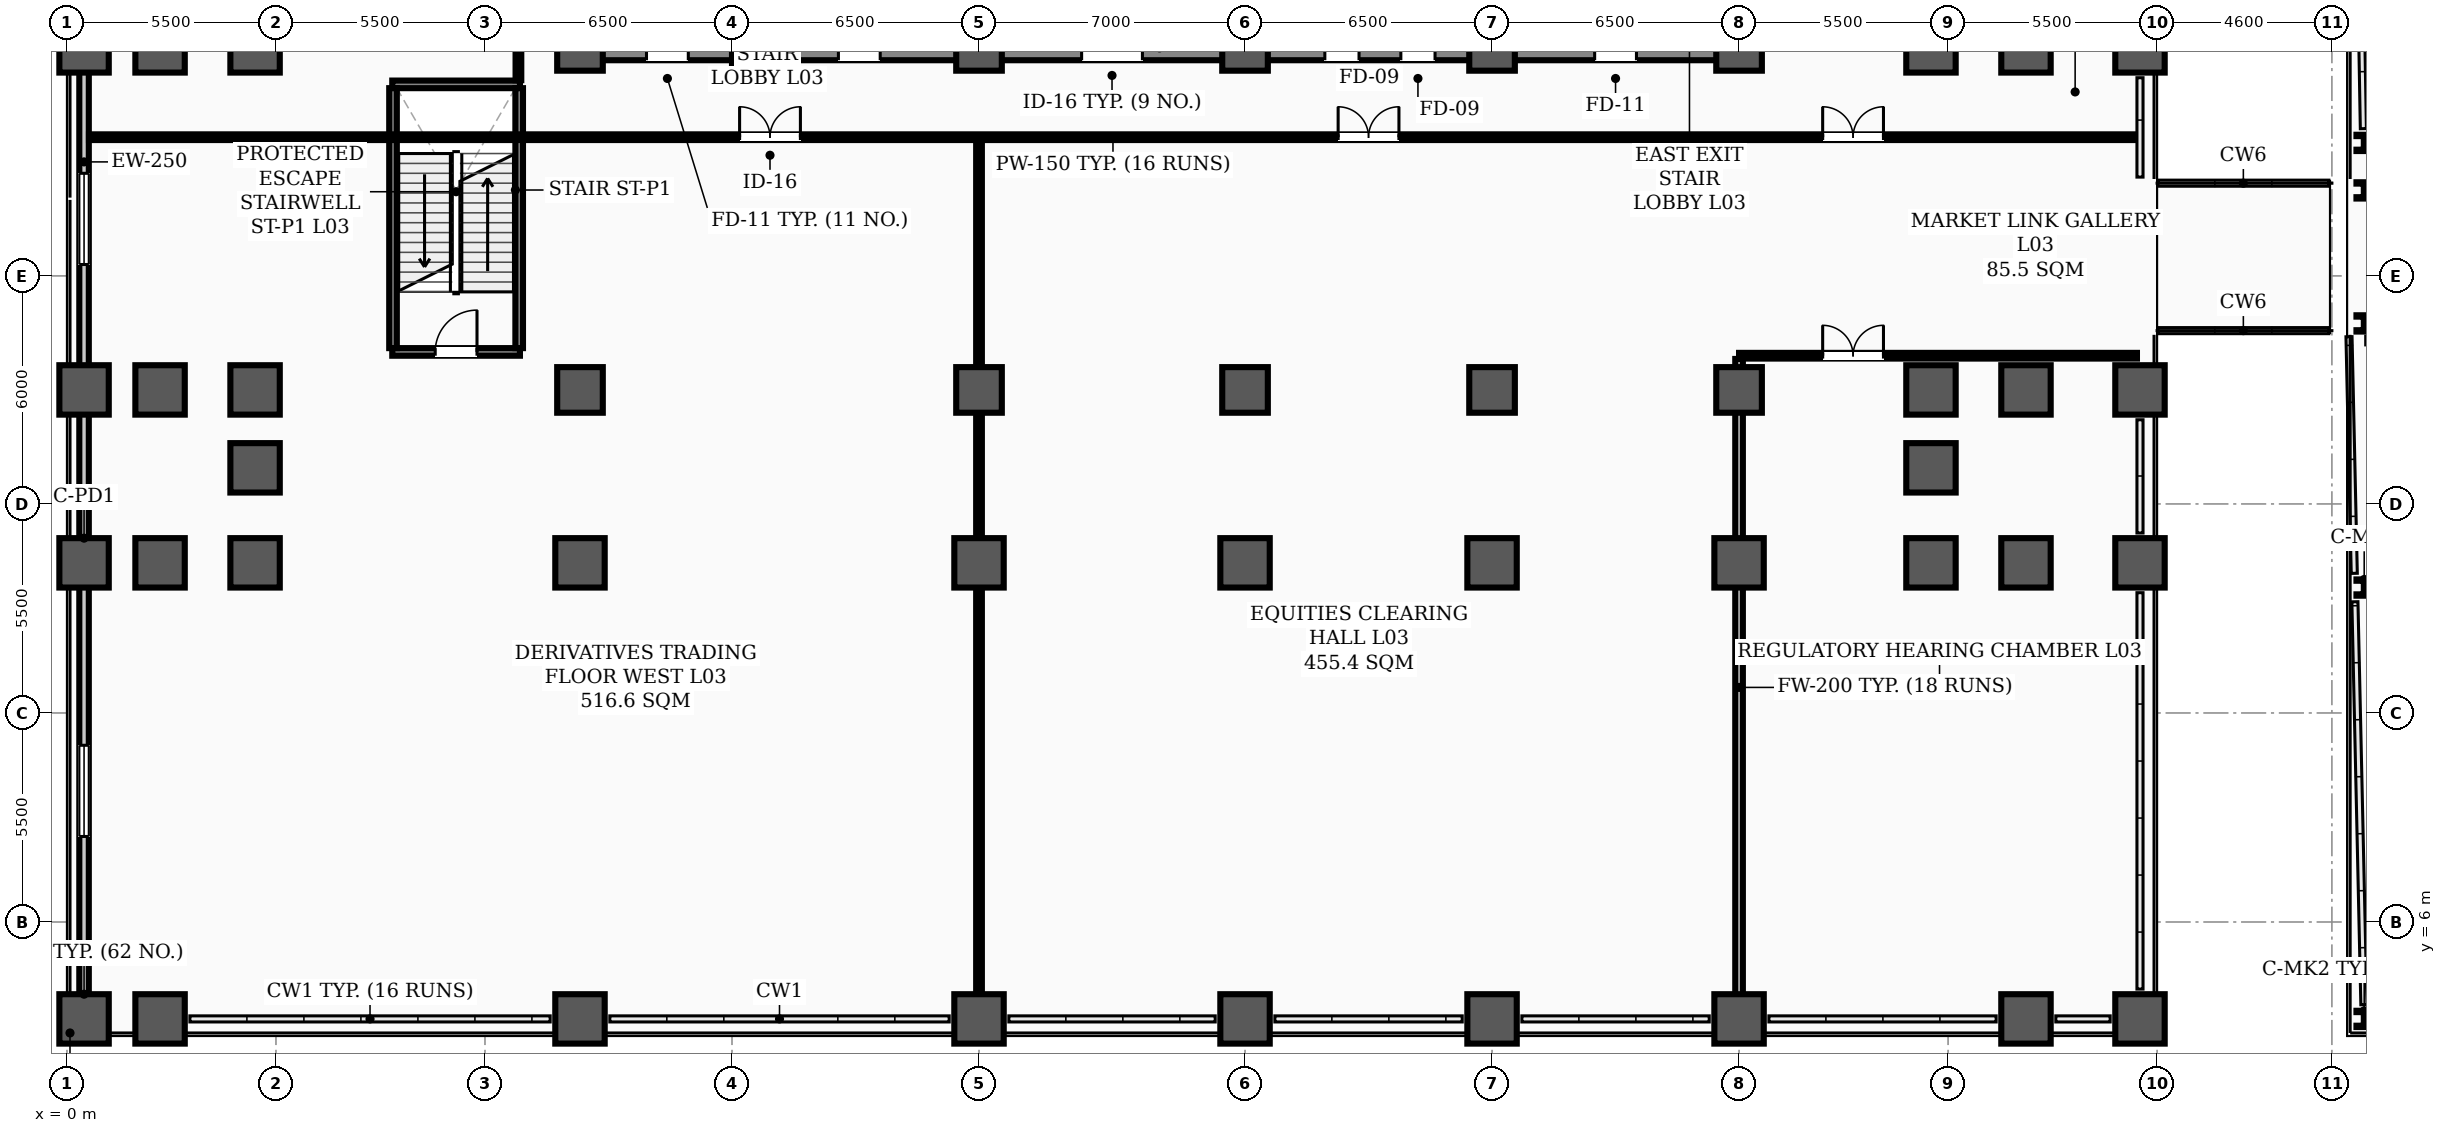
"""IFC4 building model, lengths in metres.
Left out: names, types, materials, properties, quantities, classifications, styles, units other than length and angle.
Written with IfcOpenShell. Run it as: python <this file> out.ifc"""

import sys

from ifc_helpers import new_model, si_unit, direction, frame, frame_2d, origin, origin_2d, place, context, subcontext, project, spatial, rectangle, hollow_rectangle, i_section, extrude, element, fill, save


model = new_model("IFC4")
c1 = context("Model", 3, precision=1e-05, world=origin(), true_north=direction((0.0, 1.0)))
c2 = subcontext(c1, "Body", "Model", "MODEL_VIEW")
j1 = project(units=[si_unit("LENGTHUNIT", "METRE"), si_unit("PLANEANGLEUNIT", "RADIAN")], contexts=[c1])
p1 = place(None, origin())
s1 = spatial("IfcSite", under=j1, at=p1, CompositionType="ELEMENT")
p2 = place(p1, origin())
s2 = spatial("IfcBuilding", under=s1, at=p2, CompositionType="ELEMENT")
p3 = place(p2, frame((0.0, 0.0, 11.2)))
s3 = spatial("IfcBuildingStorey", under=s2, at=p3, CompositionType="ELEMENT", Elevation=11.2)
for number, where, z_axis, x_axis in (
    (1, (13.5, 29.0, 0.0), (0.0, 0.0, 1.0), (1.0, 0.0, 0.0)),
    (2, (18.1, 29.0, 0.0), (0.0, 0.0, 1.0), (1.0, 0.0, 0.0)),
    (3, (24.0, 29.0, 0.0), (0.0, 0.0, 1.0), (1.0, 0.0, 0.0)),
    (4, (31.0, 29.0, 0.0), (0.0, 0.0, 1.0), (1.0, 0.0, 0.0)),
    (5, (37.5, 29.0, 0.0), (0.0, 0.0, 1.0), (1.0, 0.0, 0.0)),
    (6, (44.0, 29.0, 0.0), (0.0, 0.0, 1.0), (1.0, 0.0, 0.0)),
    (7, (13.5, 20.0, 0.0), (0.0, 0.0, 1.0), (1.0, 0.0, 0.0)),
    (8, (24.0, 20.0, 0.0), (0.0, 0.0, 1.0), (1.0, 0.0, 0.0)),
    (9, (31.0, 20.0, 0.0), (0.0, 0.0, 1.0), (1.0, 0.0, 0.0)),
    (10, (37.5, 20.0, 0.0), (0.0, 0.0, 1.0), (1.0, 0.0, 0.0)),
    (11, (44.0, 20.0, 0.0), (0.0, 0.0, 1.0), (1.0, 0.0, 0.0)),
):
    element("IfcColumn", number, at=place(p3, frame(where, z_axis=z_axis, x_axis=x_axis)), inside=s3, PredefinedType="COLUMN", context=c2, shape_type="SweptSolid", body=[
        extrude(hollow_rectangle(XDim=1.2, YDim=1.2, WallThickness=0.04, InnerFilletRadius=0.02, OuterFilletRadius=0.06, at=origin_2d()), origin(), (0.0, 0.0, 1.0), 5.4),
    ])
for number, where, z_axis, x_axis in (
    (12, (0.45, 3.45, 0.0), (0.0, 0.0, 1.0), (1.0, 0.0, 0.0)),
    (13, (0.45, 15.45, 0.0), (0.0, 0.0, 1.0), (1.0, 0.0, 0.0)),
    (14, (0.45, 20.0, 0.0), (0.0, 0.0, 1.0), (1.0, 0.0, 0.0)),
    (15, (0.45, 29.0, 0.0), (0.0, 0.0, 1.0), (1.0, 0.0, 0.0)),
    (16, (2.45, 3.45, 0.0), (0.0, 0.0, 1.0), (1.0, 0.0, 0.0)),
    (17, (2.45, 15.45, 0.0), (0.0, 0.0, 1.0), (1.0, 0.0, 0.0)),
    (18, (2.45, 20.0, 0.0), (0.0, 0.0, 1.0), (1.0, 0.0, 0.0)),
    (19, (2.45, 29.0, 0.0), (0.0, 0.0, 1.0), (1.0, 0.0, 0.0)),
    (20, (4.95, 15.45, 0.0), (0.0, 0.0, 1.0), (1.0, 0.0, 0.0)),
    (21, (4.95, 17.95, 0.0), (0.0, 0.0, 1.0), (1.0, 0.0, 0.0)),
    (22, (4.95, 20.0, 0.0), (0.0, 0.0, 1.0), (1.0, 0.0, 0.0)),
    (23, (4.95, 29.0, 0.0), (0.0, 0.0, 1.0), (1.0, 0.0, 0.0)),
    (24, (13.5, 3.45, 0.0), (0.0, 0.0, 1.0), (1.0, 0.0, 0.0)),
    (25, (13.5, 15.45, 0.0), (0.0, 0.0, 1.0), (1.0, 0.0, 0.0)),
    (26, (24.0, 3.45, 0.0), (0.0, 0.0, 1.0), (1.0, 0.0, 0.0)),
    (27, (24.0, 15.45, 0.0), (0.0, 0.0, 1.0), (1.0, 0.0, 0.0)),
    (28, (31.0, 3.45, 0.0), (0.0, 0.0, 1.0), (1.0, 0.0, 0.0)),
    (29, (31.0, 15.45, 0.0), (0.0, 0.0, 1.0), (1.0, 0.0, 0.0)),
    (30, (37.5, 3.45, 0.0), (0.0, 0.0, 1.0), (1.0, 0.0, 0.0)),
    (31, (37.5, 15.45, 0.0), (0.0, 0.0, 1.0), (1.0, 0.0, 0.0)),
    (32, (44.0, 3.45, 0.0), (0.0, 0.0, 1.0), (1.0, 0.0, 0.0)),
    (33, (44.0, 15.45, 0.0), (0.0, 0.0, 1.0), (1.0, 0.0, 0.0)),
    (34, (49.05, 15.45, 0.0), (0.0, 0.0, 1.0), (1.0, 0.0, 0.0)),
    (35, (49.05, 17.95, 0.0), (0.0, 0.0, 1.0), (1.0, 0.0, 0.0)),
    (36, (49.05, 20.0, 0.0), (0.0, 0.0, 1.0), (1.0, 0.0, 0.0)),
    (37, (49.05, 29.0, 0.0), (0.0, 0.0, 1.0), (1.0, 0.0, 0.0)),
    (38, (51.55, 3.45, 0.0), (0.0, 0.0, 1.0), (1.0, 0.0, 0.0)),
    (39, (51.55, 15.45, 0.0), (0.0, 0.0, 1.0), (1.0, 0.0, 0.0)),
    (40, (51.55, 20.0, 0.0), (0.0, 0.0, 1.0), (1.0, 0.0, 0.0)),
    (41, (51.55, 29.0, 0.0), (0.0, 0.0, 1.0), (1.0, 0.0, 0.0)),
    (42, (54.55, 3.45, 0.0), (0.0, 0.0, 1.0), (1.0, 0.0, 0.0)),
    (43, (54.55, 15.45, 0.0), (0.0, 0.0, 1.0), (1.0, 0.0, 0.0)),
    (44, (54.55, 20.0, 0.0), (0.0, 0.0, 1.0), (1.0, 0.0, 0.0)),
    (45, (54.55, 29.0, 0.0), (0.0, 0.0, 1.0), (1.0, 0.0, 0.0)),
):
    element("IfcColumn", number, at=place(p3, frame(where, z_axis=z_axis, x_axis=x_axis)), inside=s3, PredefinedType="COLUMN", context=c2, shape_type="SweptSolid", body=[
        extrude(rectangle(XDim=1.3, YDim=1.3, at=origin_2d()), origin(), (0.0, 0.0, 1.0), 5.4),
    ])
for number, where, z_axis, x_axis in (
    (46, (60.45, 3.45, 0.0), (0.0, 0.0, 1.0), (1.0, 0.0, 0.0)),
    (47, (60.45, 14.8, 0.0), (0.0, 0.0, 1.0), (1.0, 0.0, 0.0)),
    (48, (60.45, 21.75, 0.0), (0.0, 0.0, 1.0), (1.0, 0.0, 0.0)),
    (49, (60.45, 25.25, 0.0), (0.0, 0.0, 1.0), (1.0, 0.0, 0.0)),
    (50, (60.45, 26.5, 0.0), (0.0, 0.0, 1.0), (1.0, 0.0, 0.0)),
):
    element("IfcColumn", number, at=place(p3, frame(where, z_axis=z_axis, x_axis=x_axis)), inside=s3, PredefinedType="COLUMN", context=c2, shape_type="SweptSolid", body=[
        extrude(i_section(OverallWidth=0.407, OverallDepth=0.428, WebThickness=0.02, FlangeThickness=0.035, FilletRadius=0.022, at=origin_2d()), origin(), (0.0, 0.0, 1.0), 5.4),
    ])
p4 = place(p3, frame((0.45, 3.45, 0.0), z_axis=(0.0, 0.0, 1.0), x_axis=(0.0, 1.0, 0.0)))
e51 = element("IfcWall", 51, at=p4, inside=s3, PredefinedType="STANDARD", context=c2, shape_type="SweptSolid", body=[
    extrude(rectangle(XDim=45.1, YDim=0.25, at=frame_2d((22.55, 0.0))), origin(), (0.0, 0.0, 1.0), 4.37),
])
p5 = place(p4, frame((4.8, 0.0, 0.9)))
e52 = element("IfcOpeningElement", 52, at=p5, cuts=e51, PredefinedType="OPENING", context=c2, shape_type="SweptSolid", body=[
    extrude(rectangle(XDim=2.4, YDim=2.1, at=frame_2d((1.2, 1.05))), frame((0.0, 0.135, 0.0), z_axis=(0.0, -1.0, 0.0), x_axis=(1.0, 0.0, 0.0)), (0.0, 0.0, 1.0), 0.27),
])
p6 = place(p4, frame((19.85, 0.0, 0.9)))
e53 = element("IfcOpeningElement", 53, at=p6, cuts=e51, PredefinedType="OPENING", context=c2, shape_type="SweptSolid", body=[
    extrude(rectangle(XDim=2.4, YDim=2.1, at=frame_2d((1.2, 1.05))), frame((0.0, 0.135, 0.0), z_axis=(0.0, -1.0, 0.0), x_axis=(1.0, 0.0, 0.0)), (0.0, 0.0, 1.0), 0.27),
])
p7 = place(p4, frame((29.0, 0.0, 0.9)))
e54 = element("IfcOpeningElement", 54, at=p7, cuts=e51, PredefinedType="OPENING", context=c2, shape_type="SweptSolid", body=[
    extrude(rectangle(XDim=2.4, YDim=2.1, at=frame_2d((1.2, 1.05))), frame((0.0, 0.135, 0.0), z_axis=(0.0, -1.0, 0.0), x_axis=(1.0, 0.0, 0.0)), (0.0, 0.0, 1.0), 0.27),
])
p8 = place(p4, frame((36.75, 0.0, 0.9)))
e55 = element("IfcOpeningElement", 55, at=p8, cuts=e51, PredefinedType="OPENING", context=c2, shape_type="SweptSolid", body=[
    extrude(rectangle(XDim=2.4, YDim=2.1, at=frame_2d((1.2, 1.05))), frame((0.0, 0.135, 0.0), z_axis=(0.0, -1.0, 0.0), x_axis=(1.0, 0.0, 0.0)), (0.0, 0.0, 1.0), 0.27),
])
p9 = place(p3, frame((60.45, 3.45, 0.0), z_axis=(0.0, 0.0, 1.0), x_axis=(1.0, 0.0, 0.0)))
e56 = element("IfcWall", 56, at=p9, inside=s3, PredefinedType="STANDARD", context=c2, shape_type="SweptSolid", body=[
    extrude(rectangle(XDim=16.7, YDim=0.25, at=frame_2d((8.35, 0.0))), origin(), (0.0, 0.0, 1.0), 4.5),
])
p10 = place(p9, frame((2.85, 0.0, 0.95)))
e57 = element("IfcOpeningElement", 57, at=p10, cuts=e56, PredefinedType="OPENING", context=c2, shape_type="SweptSolid", body=[
    extrude(rectangle(XDim=2.0, YDim=1.8, at=frame_2d((1.0, 0.9))), frame((0.0, 0.135, 0.0), z_axis=(0.0, -1.0, 0.0), x_axis=(1.0, 0.0, 0.0)), (0.0, 0.0, 1.0), 0.27),
])
p11 = place(p9, frame((11.35, 0.0, 0.95)))
e58 = element("IfcOpeningElement", 58, at=p11, cuts=e56, PredefinedType="OPENING", context=c2, shape_type="SweptSolid", body=[
    extrude(rectangle(XDim=2.0, YDim=1.8, at=frame_2d((1.0, 0.9))), frame((0.0, 0.135, 0.0), z_axis=(0.0, -1.0, 0.0), x_axis=(1.0, 0.0, 0.0)), (0.0, 0.0, 1.0), 0.27),
])
p12 = place(p3, frame((13.5, 29.0, 0.0), z_axis=(0.0, 0.0, 1.0), x_axis=(1.0, 0.0, 0.0)))
e59 = element("IfcWall", 59, at=p12, inside=s3, PredefinedType="SHEAR", context=c2, shape_type="SweptSolid", body=[
    extrude(rectangle(XDim=30.5, YDim=0.65, at=frame_2d((15.25, 0.0))), origin(), (0.0, 0.0, 1.0), 5.15),
])
p13 = place(p12, frame((1.75, 0.0, 0.0)))
e60 = element("IfcOpeningElement", 60, at=p13, cuts=e59, PredefinedType="OPENING", context=c2, shape_type="SweptSolid", body=[
    extrude(rectangle(XDim=1.1, YDim=2.08, at=frame_2d((0.55, 1.04))), frame((0.0, 0.335, 0.0), z_axis=(0.0, -1.0, 0.0), x_axis=(1.0, 0.0, 0.0)), (0.0, 0.0, 1.0), 0.67),
])
p14 = place(p12, frame((26.7, 0.0, 0.0)))
e61 = element("IfcOpeningElement", 61, at=p14, cuts=e59, PredefinedType="OPENING", context=c2, shape_type="SweptSolid", body=[
    extrude(rectangle(XDim=1.1, YDim=2.08, at=frame_2d((0.55, 1.04))), frame((0.0, 0.335, 0.0), z_axis=(0.0, -1.0, 0.0), x_axis=(1.0, 0.0, 0.0)), (0.0, 0.0, 1.0), 0.67),
])
p15 = place(p12, frame((6.8, 0.0, 0.0)))
e62 = element("IfcOpeningElement", 62, at=p15, cuts=e59, PredefinedType="OPENING", context=c2, shape_type="SweptSolid", body=[
    extrude(rectangle(XDim=1.1, YDim=2.08, at=frame_2d((0.55, 1.04))), frame((0.0, 0.335, 0.0), z_axis=(0.0, -1.0, 0.0), x_axis=(1.0, 0.0, 0.0)), (0.0, 0.0, 1.0), 0.67),
])
p16 = place(p12, frame((13.2, 0.0, 0.0)))
e63 = element("IfcOpeningElement", 63, at=p16, cuts=e59, PredefinedType="OPENING", context=c2, shape_type="SweptSolid", body=[
    extrude(rectangle(XDim=1.6, YDim=2.08, at=frame_2d((0.8, 1.04))), frame((0.0, 0.335, 0.0), z_axis=(0.0, -1.0, 0.0), x_axis=(1.0, 0.0, 0.0)), (0.0, 0.0, 1.0), 0.67),
])
p17 = place(p12, frame((19.6, 0.0, 0.0)))
e64 = element("IfcOpeningElement", 64, at=p17, cuts=e59, PredefinedType="OPENING", context=c2, shape_type="SweptSolid", body=[
    extrude(rectangle(XDim=0.9, YDim=2.08, at=frame_2d((0.45, 1.04))), frame((0.0, 0.335, 0.0), z_axis=(0.0, -1.0, 0.0), x_axis=(1.0, 0.0, 0.0)), (0.0, 0.0, 1.0), 0.67),
])
p18 = place(p12, frame((21.6, 0.0, 0.0)))
e65 = element("IfcOpeningElement", 65, at=p18, cuts=e59, PredefinedType="OPENING", context=c2, shape_type="SweptSolid", body=[
    extrude(rectangle(XDim=0.9, YDim=2.08, at=frame_2d((0.45, 1.04))), frame((0.0, 0.335, 0.0), z_axis=(0.0, -1.0, 0.0), x_axis=(1.0, 0.0, 0.0)), (0.0, 0.0, 1.0), 0.67),
])
p19 = place(p3, frame((8.56, 21.0, 0.0), z_axis=(0.0, 0.0, 1.0), x_axis=(1.0, 0.0, 0.0)))
e66 = element("IfcWall", 66, at=p19, inside=s3, PredefinedType="STANDARD", context=c2, shape_type="SweptSolid", body=[
    extrude(rectangle(XDim=3.36, YDim=0.2, at=frame_2d((1.68, 0.0))), origin(), (0.0, 0.0, 1.0), 5.15),
])
p20 = place(p19, frame((1.13, 0.0, 0.0)))
e67 = element("IfcOpeningElement", 67, at=p20, cuts=e66, PredefinedType="OPENING", context=c2, shape_type="SweptSolid", body=[
    extrude(rectangle(XDim=1.1, YDim=2.08, at=frame_2d((0.55, 1.04))), frame((0.0, 0.11, 0.0), z_axis=(0.0, -1.0, 0.0), x_axis=(1.0, 0.0, 0.0)), (0.0, 0.0, 1.0), 0.22),
])
p21 = place(p3, frame((8.56, 28.04, 0.0), z_axis=(0.0, 0.0, 1.0), x_axis=(1.0, 0.0, 0.0)))
e68 = element("IfcWall", 68, at=p21, inside=s3, PredefinedType="STANDARD", context=c2, shape_type="SweptSolid", body=[
    extrude(rectangle(XDim=3.36, YDim=0.2, at=frame_2d((1.68, 0.0))), origin(), (0.0, 0.0, 1.0), 5.15),
])
for number, where, z_axis, x_axis in (
    (69, (8.58, 21.1, 0.0), (0.0, 0.0, 1.0), (0.0, 1.0, 0.0)),
    (70, (11.9, 21.1, 0.0), (0.0, 0.0, 1.0), (0.0, 1.0, 0.0)),
):
    element("IfcWall", number, at=place(p3, frame(where, z_axis=z_axis, x_axis=x_axis)), inside=s3, PredefinedType="STANDARD", context=c2, shape_type="SweptSolid", body=[
        extrude(rectangle(XDim=6.84, YDim=0.2, at=frame_2d((3.42, 0.0))), origin(), (0.0, 0.0, 1.0), 5.15),
    ])
p22 = place(p3, frame((0.58, 26.65, 0.0), z_axis=(0.0, 0.0, 1.0), x_axis=(1.0, 0.0, 0.0)))
e71 = element("IfcWall", 71, at=p22, inside=s3, PredefinedType="PARTITIONING", context=c2, shape_type="SweptSolid", body=[
    extrude(rectangle(XDim=53.89, YDim=0.15, at=frame_2d((26.945, 0.0))), origin(), (0.0, 0.0, 1.0), 4.43),
])
p23 = place(p22, frame((17.12, 0.0, 0.0)))
e72 = element("IfcOpeningElement", 72, at=p23, cuts=e71, PredefinedType="OPENING", context=c2, shape_type="SweptSolid", body=[
    extrude(rectangle(XDim=1.6, YDim=2.08, at=frame_2d((0.8, 1.04))), frame((0.0, 0.085, 0.0), z_axis=(0.0, -1.0, 0.0), x_axis=(1.0, 0.0, 0.0)), (0.0, 0.0, 1.0), 0.17),
])
p24 = place(p22, frame((32.87, 0.0, 0.0)))
e73 = element("IfcOpeningElement", 73, at=p24, cuts=e71, PredefinedType="OPENING", context=c2, shape_type="SweptSolid", body=[
    extrude(rectangle(XDim=1.6, YDim=2.08, at=frame_2d((0.8, 1.04))), frame((0.0, 0.085, 0.0), z_axis=(0.0, -1.0, 0.0), x_axis=(1.0, 0.0, 0.0)), (0.0, 0.0, 1.0), 0.17),
])
p25 = place(p22, frame((45.62, 0.0, 0.0)))
e74 = element("IfcOpeningElement", 74, at=p25, cuts=e71, PredefinedType="OPENING", context=c2, shape_type="SweptSolid", body=[
    extrude(rectangle(XDim=1.6, YDim=2.08, at=frame_2d((0.8, 1.04))), frame((0.0, 0.085, 0.0), z_axis=(0.0, -1.0, 0.0), x_axis=(1.0, 0.0, 0.0)), (0.0, 0.0, 1.0), 0.17),
])
p26 = place(p3, frame((44.0, 20.9, 0.0), z_axis=(0.0, 0.0, 1.0), x_axis=(1.0, 0.0, 0.0)))
e75 = element("IfcWall", 75, at=p26, inside=s3, PredefinedType="PARTITIONING", context=c2, shape_type="SweptSolid", body=[
    extrude(rectangle(XDim=10.47, YDim=0.15, at=frame_2d((5.235, 0.0))), origin(), (0.0, 0.0, 1.0), 4.43),
])
p27 = place(p26, frame((2.2, 0.0, 0.0)))
e76 = element("IfcOpeningElement", 76, at=p27, cuts=e75, PredefinedType="OPENING", context=c2, shape_type="SweptSolid", body=[
    extrude(rectangle(XDim=1.6, YDim=2.08, at=frame_2d((0.8, 1.04))), frame((0.0, 0.085, 0.0), z_axis=(0.0, -1.0, 0.0), x_axis=(1.0, 0.0, 0.0)), (0.0, 0.0, 1.0), 0.17),
])
p28 = place(p3, frame((24.0, 3.53, 0.0), z_axis=(0.0, 0.0, 1.0), x_axis=(0.0, 1.0, 0.0)))
e77 = element("IfcWall", 77, at=p28, inside=s3, PredefinedType="PARTITIONING", context=c2, shape_type="SweptSolid", body=[
    extrude(rectangle(XDim=23.035, YDim=0.15, at=frame_2d((11.518, 0.0))), origin(), (0.0, 0.0, 1.0), 4.33),
])
p29 = place(p3, frame((44.0, 3.53, 0.0), z_axis=(0.0, 0.0, 1.0), x_axis=(0.0, 1.0, 0.0)))
e78 = element("IfcWall", 78, at=p29, inside=s3, PredefinedType="STANDARD", context=c2, shape_type="SweptSolid", body=[
    extrude(rectangle(XDim=17.285, YDim=0.2, at=frame_2d((8.643, 0.0))), origin(), (0.0, 0.0, 1.0), 4.33),
])
p30 = place(p3, frame((11.88, 28.15, 0.0), z_axis=(0.0, 0.0, 1.0), x_axis=(0.0, 1.0, 0.0)))
e79 = element("IfcWall", 79, at=p30, inside=s3, PredefinedType="PARTITIONING", context=c2, shape_type="SweptSolid", body=[
    extrude(rectangle(XDim=12.165, YDim=0.15, at=frame_2d((6.083, 0.0))), origin(), (0.0, 0.0, 1.0), 4.33),
])
p31 = place(p5, origin())
e80 = element("IfcWindow", 80, at=p31, inside=s3, PartitioningType="SINGLE_PANEL", PredefinedType="WINDOW", context=c2, shape_type="SweptSolid", body=[
    extrude(rectangle(XDim=2.4, YDim=2.1, at=frame_2d((1.2, 1.05))), frame((0.0, 0.03, 0.0), z_axis=(0.0, -1.0, 0.0), x_axis=(1.0, 0.0, 0.0)), (0.0, 0.0, 1.0), 0.06),
])
fill(e52, e80)
p32 = place(p6, origin())
e81 = element("IfcWindow", 81, at=p32, inside=s3, PartitioningType="SINGLE_PANEL", PredefinedType="WINDOW", context=c2, shape_type="SweptSolid", body=[
    extrude(rectangle(XDim=2.4, YDim=2.1, at=frame_2d((1.2, 1.05))), frame((0.0, 0.03, 0.0), z_axis=(0.0, -1.0, 0.0), x_axis=(1.0, 0.0, 0.0)), (0.0, 0.0, 1.0), 0.06),
])
fill(e53, e81)
p33 = place(p20, origin())
e82 = element("IfcDoor", 82, at=p33, inside=s3, OperationType="SINGLE_SWING_RIGHT", PredefinedType="DOOR", context=c2, shape_type="SweptSolid", body=[
    extrude(rectangle(XDim=1.1, YDim=2.08, at=frame_2d((0.55, 1.04))), frame((0.0, 0.025, 0.0), z_axis=(0.0, -1.0, 0.0), x_axis=(1.0, 0.0, 0.0)), (0.0, 0.0, 1.0), 0.05),
])
fill(e67, e82)
p34 = place(p23, origin())
e83 = element("IfcDoor", 83, at=p34, inside=s3, OperationType="DOUBLE_DOOR_SINGLE_SWING", PredefinedType="DOOR", context=c2, shape_type="SweptSolid", body=[
    extrude(rectangle(XDim=1.6, YDim=2.08, at=frame_2d((0.8, 1.04))), frame((0.0, 0.025, 0.0), z_axis=(0.0, -1.0, 0.0), x_axis=(1.0, 0.0, 0.0)), (0.0, 0.0, 1.0), 0.05),
])
fill(e72, e83)
p35 = place(p24, origin())
e84 = element("IfcDoor", 84, at=p35, inside=s3, OperationType="DOUBLE_DOOR_SINGLE_SWING", PredefinedType="DOOR", context=c2, shape_type="SweptSolid", body=[
    extrude(rectangle(XDim=1.6, YDim=2.08, at=frame_2d((0.8, 1.04))), frame((0.0, 0.025, 0.0), z_axis=(0.0, -1.0, 0.0), x_axis=(1.0, 0.0, 0.0)), (0.0, 0.0, 1.0), 0.05),
])
fill(e73, e84)
p36 = place(p27, origin())
e85 = element("IfcDoor", 85, at=p36, inside=s3, OperationType="DOUBLE_DOOR_SINGLE_SWING", PredefinedType="DOOR", context=c2, shape_type="SweptSolid", body=[
    extrude(rectangle(XDim=1.6, YDim=2.08, at=frame_2d((0.8, 1.04))), frame((0.0, 0.025, 0.0), z_axis=(0.0, -1.0, 0.0), x_axis=(1.0, 0.0, 0.0)), (0.0, 0.0, 1.0), 0.05),
])
fill(e76, e85)
p37 = place(p25, origin())
e86 = element("IfcDoor", 86, at=p37, inside=s3, OperationType="DOUBLE_DOOR_SINGLE_SWING", PredefinedType="DOOR", context=c2, shape_type="SweptSolid", body=[
    extrude(rectangle(XDim=1.6, YDim=2.08, at=frame_2d((0.8, 1.04))), frame((0.0, 0.025, 0.0), z_axis=(0.0, -1.0, 0.0), x_axis=(1.0, 0.0, 0.0)), (0.0, 0.0, 1.0), 0.05),
])
fill(e74, e86)
save(model, sys.argv[1])
